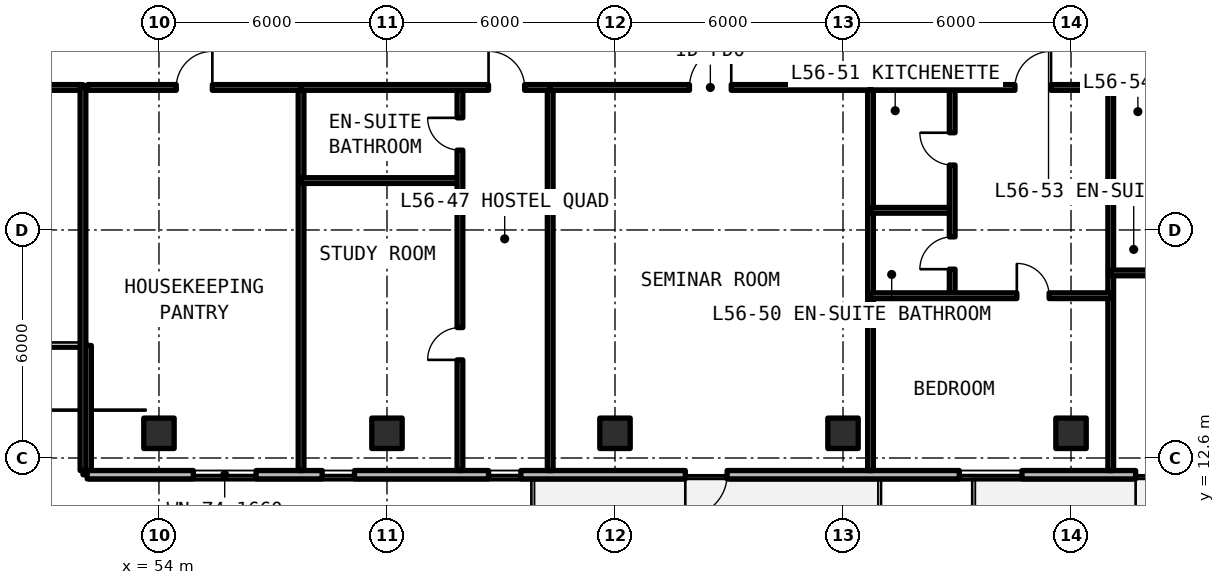
"""IFC4 building model, lengths in metres.
Left out: names, types, materials, properties, quantities, classifications, styles, units other than length and angle.
Written with IfcOpenShell. Run it as: python <this file> out.ifc"""

import sys

from ifc_helpers import new_model, si_unit, direction, frame, frame_2d, origin, origin_2d, place, context, subcontext, project, spatial, rectangle, extrude, element, fill, save


model = new_model("IFC4")
c1 = context("Model", 3, precision=1e-05, world=origin(), true_north=direction((0.0, 1.0)))
c2 = subcontext(c1, "Body", "Model", "MODEL_VIEW")
j1 = project(units=[si_unit("LENGTHUNIT", "METRE"), si_unit("PLANEANGLEUNIT", "RADIAN")], contexts=[c1])
p1 = place(None, origin())
s1 = spatial("IfcSite", under=j1, at=p1, CompositionType="ELEMENT")
p2 = place(p1, origin())
s2 = spatial("IfcBuilding", under=s1, at=p2, CompositionType="ELEMENT")
p3 = place(p2, frame((0.0, 0.0, 201.63)))
s3 = spatial("IfcBuildingStorey", under=s2, at=p3, CompositionType="ELEMENT", Elevation=201.63)
for number, where, z_axis, x_axis in (
    (1, (54.0, 13.25, 0.0), (0.0, 0.0, 1.0), (1.0, 0.0, 0.0)),
    (2, (60.0, 13.25, 0.0), (0.0, 0.0, 1.0), (1.0, 0.0, 0.0)),
    (3, (66.0, 13.25, 0.0), (0.0, 0.0, 1.0), (1.0, 0.0, 0.0)),
    (4, (72.0, 13.25, 0.0), (0.0, 0.0, 1.0), (1.0, 0.0, 0.0)),
    (5, (78.0, 13.25, 0.0), (0.0, 0.0, 1.0), (1.0, 0.0, 0.0)),
):
    element("IfcColumn", number, at=place(p3, frame(where, z_axis=z_axis, x_axis=x_axis)), inside=s3, PredefinedType="COLUMN", context=c2, shape_type="SweptSolid", body=[
        extrude(rectangle(XDim=0.8, YDim=0.8, at=origin_2d()), origin(), (0.0, 0.0, 1.0), 3.3),
    ])
p4 = place(p3, frame((52.11, 15.56, 0.0), z_axis=(0.0, 0.0, 1.0), x_axis=(0.0, -1.0, 0.0)))
e6 = element("IfcWall", 6, at=p4, inside=s3, PredefinedType="SOLIDWALL", context=c2, shape_type="SweptSolid", body=[
    extrude(rectangle(XDim=3.4, YDim=0.22, at=frame_2d((1.7, 0.0))), origin(), (0.0, 0.0, 1.0), 3.08),
])
p5 = place(p3, frame((52.11, 12.16, 0.0), z_axis=(0.0, 0.0, 1.0), x_axis=(1.0, 0.0, 0.0)))
e7 = element("IfcWall", 7, at=p5, inside=s3, PredefinedType="SOLIDWALL", context=c2, shape_type="SweptSolid", body=[
    extrude(rectangle(XDim=43.244, YDim=0.22, at=frame_2d((21.622, 0.0))), origin(), (0.0, 0.0, 1.0), 3.08),
])
p6 = place(p5, frame((15.74, 0.0, 0.0)))
e8 = element("IfcOpeningElement", 8, at=p6, cuts=e7, PredefinedType="OPENING", context=c2, shape_type="SweptSolid", body=[
    extrude(rectangle(XDim=1.1, YDim=2.15, at=frame_2d((0.55, 1.075))), frame((0.0, 0.12, 0.0), z_axis=(0.0, -1.0, 0.0), x_axis=(1.0, 0.0, 0.0)), (0.0, 0.0, 1.0), 0.24),
])
p7 = place(p5, frame((27.59, 0.0, 0.0)))
e9 = element("IfcOpeningElement", 9, at=p7, cuts=e7, PredefinedType="OPENING", context=c2, shape_type="SweptSolid", body=[
    extrude(rectangle(XDim=1.1, YDim=2.15, at=frame_2d((0.55, 1.075))), frame((0.0, 0.12, 0.0), z_axis=(0.0, -1.0, 0.0), x_axis=(1.0, 0.0, 0.0)), (0.0, 0.0, 1.0), 0.24),
])
p8 = place(p5, frame((2.795, 0.0, 0.78)))
e10 = element("IfcOpeningElement", 10, at=p8, cuts=e7, PredefinedType="OPENING", context=c2, shape_type="SweptSolid", body=[
    extrude(rectangle(XDim=1.65, YDim=1.66, at=frame_2d((0.825, 0.83))), frame((0.0, 0.12, 0.0), z_axis=(0.0, -1.0, 0.0), x_axis=(1.0, 0.0, 0.0)), (0.0, 0.0, 1.0), 0.24),
])
p9 = place(p5, frame((6.185, 0.0, 0.78)))
e11 = element("IfcOpeningElement", 11, at=p9, cuts=e7, PredefinedType="OPENING", context=c2, shape_type="SweptSolid", body=[
    extrude(rectangle(XDim=0.85, YDim=1.65, at=frame_2d((0.425, 0.825))), frame((0.0, 0.12, 0.0), z_axis=(0.0, -1.0, 0.0), x_axis=(1.0, 0.0, 0.0)), (0.0, 0.0, 1.0), 0.24),
])
p10 = place(p5, frame((10.562, 0.0, 0.78)))
e12 = element("IfcOpeningElement", 12, at=p10, cuts=e7, PredefinedType="OPENING", context=c2, shape_type="SweptSolid", body=[
    extrude(rectangle(XDim=0.85, YDim=1.65, at=frame_2d((0.425, 0.825))), frame((0.0, 0.12, 0.0), z_axis=(0.0, -1.0, 0.0), x_axis=(1.0, 0.0, 0.0)), (0.0, 0.0, 1.0), 0.24),
])
p11 = place(p5, frame((22.949, 0.0, 0.78)))
e13 = element("IfcOpeningElement", 13, at=p11, cuts=e7, PredefinedType="OPENING", context=c2, shape_type="SweptSolid", body=[
    extrude(rectangle(XDim=1.65, YDim=1.66, at=frame_2d((0.825, 0.83))), frame((0.0, 0.12, 0.0), z_axis=(0.0, -1.0, 0.0), x_axis=(1.0, 0.0, 0.0)), (0.0, 0.0, 1.0), 0.24),
])
p12 = place(p5, frame((33.573, 0.0, 0.78)))
e14 = element("IfcOpeningElement", 14, at=p12, cuts=e7, PredefinedType="OPENING", context=c2, shape_type="SweptSolid", body=[
    extrude(rectangle(XDim=1.65, YDim=1.66, at=frame_2d((0.825, 0.83))), frame((0.0, 0.12, 0.0), z_axis=(0.0, -1.0, 0.0), x_axis=(1.0, 0.0, 0.0)), (0.0, 0.0, 1.0), 0.24),
])
p13 = place(p5, frame((38.514, 0.0, 0.78)))
e15 = element("IfcOpeningElement", 15, at=p13, cuts=e7, PredefinedType="OPENING", context=c2, shape_type="SweptSolid", body=[
    extrude(rectangle(XDim=0.85, YDim=1.65, at=frame_2d((0.425, 0.825))), frame((0.0, 0.12, 0.0), z_axis=(0.0, -1.0, 0.0), x_axis=(1.0, 0.0, 0.0)), (0.0, 0.0, 1.0), 0.24),
])
p14 = place(p5, frame((40.615, 0.0, 0.78)))
e16 = element("IfcOpeningElement", 16, at=p14, cuts=e7, PredefinedType="OPENING", context=c2, shape_type="SweptSolid", body=[
    extrude(rectangle(XDim=1.65, YDim=1.66, at=frame_2d((0.825, 0.83))), frame((0.0, 0.12, 0.0), z_axis=(0.0, -1.0, 0.0), x_axis=(1.0, 0.0, 0.0)), (0.0, 0.0, 1.0), 0.24),
])
p15 = place(p3, frame((43.6, 22.35, 0.0), z_axis=(0.0, 0.0, 1.0), x_axis=(1.0, 0.0, 0.0)))
e17 = element("IfcWall", 17, at=p15, inside=s3, PredefinedType="SOLIDWALL", context=c2, shape_type="SweptSolid", body=[
    extrude(rectangle(XDim=8.4, YDim=0.15, at=frame_2d((4.2, 0.0))), origin(), (0.0, 0.0, 1.0), 2.35),
])
p16 = place(p15, frame((3.65, 0.0, 0.0)))
e18 = element("IfcOpeningElement", 18, at=p16, cuts=e17, PredefinedType="OPENING", context=c2, shape_type="SweptSolid", body=[
    extrude(rectangle(XDim=1.1, YDim=2.15, at=frame_2d((0.55, 1.075))), frame((0.0, 0.085, 0.0), z_axis=(0.0, -1.0, 0.0), x_axis=(1.0, 0.0, 0.0)), (0.0, 0.0, 1.0), 0.17),
])
for number, where, z_axis, x_axis in (
    (19, (52.0, 12.27, 0.0), (0.0, 0.0, 1.0), (0.0, 1.0, 0.0)),
    (20, (57.739, 12.27, 0.0), (0.0, 0.0, 1.0), (0.0, 1.0, 0.0)),
):
    element("IfcWall", number, at=place(p3, frame(where, z_axis=z_axis, x_axis=x_axis)), inside=s3, PredefinedType="SOLIDWALL", context=c2, shape_type="SweptSolid", body=[
        extrude(rectangle(XDim=10.08, YDim=0.15, at=frame_2d((5.04, 0.0))), origin(), (0.0, 0.0, 1.0), 2.35),
    ])
p17 = place(p3, frame((52.12, 22.35, 0.0), z_axis=(0.0, 0.0, 1.0), x_axis=(1.0, 0.0, 0.0)))
e21 = element("IfcWall", 21, at=p17, inside=s3, PredefinedType="SOLIDWALL", context=c2, shape_type="SweptSolid", body=[
    extrude(rectangle(XDim=5.619, YDim=0.15, at=frame_2d((2.81, 0.0))), origin(), (0.0, 0.0, 1.0), 2.35),
])
p18 = place(p17, frame((2.335, 0.0, 0.0)))
e22 = element("IfcOpeningElement", 22, at=p18, cuts=e21, PredefinedType="OPENING", context=c2, shape_type="SweptSolid", body=[
    extrude(rectangle(XDim=0.95, YDim=2.15, at=frame_2d((0.475, 1.075))), frame((0.0, 0.085, 0.0), z_axis=(0.0, -1.0, 0.0), x_axis=(1.0, 0.0, 0.0)), (0.0, 0.0, 1.0), 0.17),
])
p19 = place(p3, frame((64.295, 12.27, 0.0), z_axis=(0.0, 0.0, 1.0), x_axis=(0.0, 1.0, 0.0)))
e23 = element("IfcWall", 23, at=p19, inside=s3, PredefinedType="SOLIDWALL", context=c2, shape_type="SweptSolid", body=[
    extrude(rectangle(XDim=10.08, YDim=0.15, at=frame_2d((5.04, 0.0))), origin(), (0.0, 0.0, 1.0), 2.35),
])
p20 = place(p3, frame((57.739, 19.9, 0.0), z_axis=(0.0, 0.0, 1.0), x_axis=(1.0, 0.0, 0.0)))
e24 = element("IfcWall", 24, at=p20, inside=s3, PredefinedType="PARTITIONING", context=c2, shape_type="SweptSolid", body=[
    extrude(rectangle(XDim=4.181, YDim=0.15, at=frame_2d((2.09, 0.0))), origin(), (0.0, 0.0, 1.0), 2.35),
])
p21 = place(p3, frame((61.92, 12.27, 0.0), z_axis=(0.0, 0.0, 1.0), x_axis=(0.0, 1.0, 0.0)))
e25 = element("IfcWall", 25, at=p21, inside=s3, PredefinedType="PARTITIONING", context=c2, shape_type="SweptSolid", body=[
    extrude(rectangle(XDim=10.08, YDim=0.15, at=frame_2d((5.04, 0.0))), origin(), (0.0, 0.0, 1.0), 2.35),
])
p22 = place(p21, frame((2.912, 0.0, 0.0)))
e26 = element("IfcOpeningElement", 26, at=p22, cuts=e25, PredefinedType="OPENING", context=c2, shape_type="SweptSolid", body=[
    extrude(rectangle(XDim=0.85, YDim=2.1, at=frame_2d((0.425, 1.05))), frame((0.0, 0.085, 0.0), z_axis=(0.0, -1.0, 0.0), x_axis=(1.0, 0.0, 0.0)), (0.0, 0.0, 1.0), 0.17),
])
p23 = place(p21, frame((8.43, 0.0, 0.0)))
e27 = element("IfcOpeningElement", 27, at=p23, cuts=e25, PredefinedType="OPENING", context=c2, shape_type="SweptSolid", body=[
    extrude(rectangle(XDim=0.85, YDim=2.1, at=frame_2d((0.425, 1.05))), frame((0.0, 0.085, 0.0), z_axis=(0.0, -1.0, 0.0), x_axis=(1.0, 0.0, 0.0)), (0.0, 0.0, 1.0), 0.17),
])
p24 = place(p3, frame((57.739, 22.35, 0.0), z_axis=(0.0, 0.0, 1.0), x_axis=(1.0, 0.0, 0.0)))
e28 = element("IfcWall", 28, at=p24, inside=s3, PredefinedType="SOLIDWALL", context=c2, shape_type="SweptSolid", body=[
    extrude(rectangle(XDim=6.556, YDim=0.15, at=frame_2d((3.278, 0.0))), origin(), (0.0, 0.0, 1.0), 2.35),
])
p25 = place(p24, frame((4.933, 0.0, 0.0)))
e29 = element("IfcOpeningElement", 29, at=p25, cuts=e28, PredefinedType="OPENING", context=c2, shape_type="SweptSolid", body=[
    extrude(rectangle(XDim=0.95, YDim=2.15, at=frame_2d((0.475, 1.075))), frame((0.0, 0.085, 0.0), z_axis=(0.0, -1.0, 0.0), x_axis=(1.0, 0.0, 0.0)), (0.0, 0.0, 1.0), 0.17),
])
p26 = place(p3, frame((72.723, 12.27, 0.0), z_axis=(0.0, 0.0, 1.0), x_axis=(0.0, 1.0, 0.0)))
e30 = element("IfcWall", 30, at=p26, inside=s3, PredefinedType="SOLIDWALL", context=c2, shape_type="SweptSolid", body=[
    extrude(rectangle(XDim=10.08, YDim=0.15, at=frame_2d((5.04, 0.0))), origin(), (0.0, 0.0, 1.0), 2.35),
])
p27 = place(p3, frame((64.295, 22.35, 0.0), z_axis=(0.0, 0.0, 1.0), x_axis=(1.0, 0.0, 0.0)))
e31 = element("IfcWall", 31, at=p27, inside=s3, PredefinedType="SOLIDWALL", context=c2, shape_type="SweptSolid", body=[
    extrude(rectangle(XDim=8.428, YDim=0.15, at=frame_2d((4.214, 0.0))), origin(), (0.0, 0.0, 1.0), 2.35),
])
p28 = place(p27, frame((3.664, 0.0, 0.0)))
e32 = element("IfcOpeningElement", 32, at=p28, cuts=e31, PredefinedType="OPENING", context=c2, shape_type="SweptSolid", body=[
    extrude(rectangle(XDim=1.1, YDim=2.15, at=frame_2d((0.55, 1.075))), frame((0.0, 0.085, 0.0), z_axis=(0.0, -1.0, 0.0), x_axis=(1.0, 0.0, 0.0)), (0.0, 0.0, 1.0), 0.17),
])
p29 = place(p3, frame((79.045, 12.27, 0.0), z_axis=(0.0, 0.0, 1.0), x_axis=(0.0, 1.0, 0.0)))
e33 = element("IfcWall", 33, at=p29, inside=s3, PredefinedType="SOLIDWALL", context=c2, shape_type="SweptSolid", body=[
    extrude(rectangle(XDim=10.08, YDim=0.15, at=frame_2d((5.04, 0.0))), origin(), (0.0, 0.0, 1.0), 2.35),
])
p30 = place(p3, frame((72.723, 19.117, 0.0), z_axis=(0.0, 0.0, 1.0), x_axis=(1.0, 0.0, 0.0)))
e34 = element("IfcWall", 34, at=p30, inside=s3, PredefinedType="PARTITIONING", context=c2, shape_type="SweptSolid", body=[
    extrude(rectangle(XDim=2.149, YDim=0.15, at=frame_2d((1.075, 0.0))), origin(), (0.0, 0.0, 1.0), 2.35),
])
p31 = place(p3, frame((74.873, 16.87, 0.0), z_axis=(0.0, 0.0, 1.0), x_axis=(0.0, 1.0, 0.0)))
e35 = element("IfcWall", 35, at=p31, inside=s3, PredefinedType="PARTITIONING", context=c2, shape_type="SweptSolid", body=[
    extrude(rectangle(XDim=5.48, YDim=0.15, at=frame_2d((2.74, 0.0))), origin(), (0.0, 0.0, 1.0), 2.35),
])
p32 = place(p31, frame((0.698, 0.0, 0.0)))
e36 = element("IfcOpeningElement", 36, at=p32, cuts=e35, PredefinedType="OPENING", context=c2, shape_type="SweptSolid", body=[
    extrude(rectangle(XDim=0.85, YDim=2.1, at=frame_2d((0.425, 1.05))), frame((0.0, 0.085, 0.0), z_axis=(0.0, -1.0, 0.0), x_axis=(1.0, 0.0, 0.0)), (0.0, 0.0, 1.0), 0.17),
])
p33 = place(p31, frame((3.438, 0.0, 0.0)))
e37 = element("IfcOpeningElement", 37, at=p33, cuts=e35, PredefinedType="OPENING", context=c2, shape_type="SweptSolid", body=[
    extrude(rectangle(XDim=0.85, YDim=2.1, at=frame_2d((0.425, 1.05))), frame((0.0, 0.085, 0.0), z_axis=(0.0, -1.0, 0.0), x_axis=(1.0, 0.0, 0.0)), (0.0, 0.0, 1.0), 0.17),
])
p34 = place(p3, frame((72.723, 16.87, 0.0), z_axis=(0.0, 0.0, 1.0), x_axis=(1.0, 0.0, 0.0)))
e38 = element("IfcWall", 38, at=p34, inside=s3, PredefinedType="PARTITIONING", context=c2, shape_type="SweptSolid", body=[
    extrude(rectangle(XDim=6.322, YDim=0.15, at=frame_2d((3.161, 0.0))), origin(), (0.0, 0.0, 1.0), 2.35),
])
p35 = place(p34, frame((3.85, 0.0, 0.0)))
e39 = element("IfcOpeningElement", 39, at=p35, cuts=e38, PredefinedType="OPENING", context=c2, shape_type="SweptSolid", body=[
    extrude(rectangle(XDim=0.85, YDim=2.1, at=frame_2d((0.425, 1.05))), frame((0.0, 0.085, 0.0), z_axis=(0.0, -1.0, 0.0), x_axis=(1.0, 0.0, 0.0)), (0.0, 0.0, 1.0), 0.17),
])
p36 = place(p3, frame((72.723, 22.35, 0.0), z_axis=(0.0, 0.0, 1.0), x_axis=(1.0, 0.0, 0.0)))
e40 = element("IfcWall", 40, at=p36, inside=s3, PredefinedType="SOLIDWALL", context=c2, shape_type="SweptSolid", body=[
    extrude(rectangle(XDim=6.322, YDim=0.15, at=frame_2d((3.161, 0.0))), origin(), (0.0, 0.0, 1.0), 2.35),
])
p37 = place(p36, frame((3.8, 0.0, 0.0)))
e41 = element("IfcOpeningElement", 41, at=p37, cuts=e40, PredefinedType="OPENING", context=c2, shape_type="SweptSolid", body=[
    extrude(rectangle(XDim=0.95, YDim=2.15, at=frame_2d((0.475, 1.075))), frame((0.0, 0.085, 0.0), z_axis=(0.0, -1.0, 0.0), x_axis=(1.0, 0.0, 0.0)), (0.0, 0.0, 1.0), 0.17),
])
p38 = place(p3, frame((79.045, 19.471, 0.0), z_axis=(0.0, 0.0, 1.0), x_axis=(1.0, 0.0, 0.0)))
e42 = element("IfcWall", 42, at=p38, inside=s3, PredefinedType="PARTITIONING", context=c2, shape_type="SweptSolid", body=[
    extrude(rectangle(XDim=2.35, YDim=0.15, at=frame_2d((1.175, 0.0))), origin(), (0.0, 0.0, 1.0), 2.35),
])
p39 = place(p3, frame((79.045, 17.47, 0.0), z_axis=(0.0, 0.0, 1.0), x_axis=(1.0, 0.0, 0.0)))
e43 = element("IfcWall", 43, at=p39, inside=s3, PredefinedType="PARTITIONING", context=c2, shape_type="SweptSolid", body=[
    extrude(rectangle(XDim=9.833, YDim=0.15, at=frame_2d((4.917, 0.0))), origin(), (0.0, 0.0, 1.0), 2.35),
])
p40 = place(p39, frame((3.307, 0.0, 0.0)))
e44 = element("IfcOpeningElement", 44, at=p40, cuts=e43, PredefinedType="OPENING", context=c2, shape_type="SweptSolid", body=[
    extrude(rectangle(XDim=0.85, YDim=2.1, at=frame_2d((0.425, 1.05))), frame((0.0, 0.085, 0.0), z_axis=(0.0, -1.0, 0.0), x_axis=(1.0, 0.0, 0.0)), (0.0, 0.0, 1.0), 0.17),
])
p41 = place(p39, frame((7.048, 0.0, 0.0)))
e45 = element("IfcOpeningElement", 45, at=p41, cuts=e43, PredefinedType="OPENING", context=c2, shape_type="SweptSolid", body=[
    extrude(rectangle(XDim=0.85, YDim=2.1, at=frame_2d((0.425, 1.05))), frame((0.0, 0.085, 0.0), z_axis=(0.0, -1.0, 0.0), x_axis=(1.0, 0.0, 0.0)), (0.0, 0.0, 1.0), 0.17),
])
p42 = place(p3, frame((79.045, 22.35, 0.0), z_axis=(0.0, 0.0, 1.0), x_axis=(1.0, 0.0, 0.0)))
e46 = element("IfcWall", 46, at=p42, inside=s3, PredefinedType="SOLIDWALL", context=c2, shape_type="SweptSolid", body=[
    extrude(rectangle(XDim=9.833, YDim=0.15, at=frame_2d((4.917, 0.0))), origin(), (0.0, 0.0, 1.0), 2.35),
])
p43 = place(p42, frame((5.657, 0.0, 0.0)))
e47 = element("IfcOpeningElement", 47, at=p43, cuts=e46, PredefinedType="OPENING", context=c2, shape_type="SweptSolid", body=[
    extrude(rectangle(XDim=0.95, YDim=2.15, at=frame_2d((0.475, 1.075))), frame((0.0, 0.085, 0.0), z_axis=(0.0, -1.0, 0.0), x_axis=(1.0, 0.0, 0.0)), (0.0, 0.0, 1.0), 0.17),
])
p44 = place(p6, frame((1.1, 0.0, 0.0), z_axis=(0.0, 0.0, 1.0), x_axis=(-1.0, 0.0, 0.0)))
e48 = element("IfcDoor", 48, at=p44, inside=s3, OperationType="SINGLE_SWING_RIGHT", PredefinedType="DOOR", context=c2, shape_type="SweptSolid", body=[
    extrude(rectangle(XDim=1.1, YDim=2.15, at=frame_2d((0.55, 1.075))), frame((0.0, 0.025, 0.0), z_axis=(0.0, -1.0, 0.0), x_axis=(1.0, 0.0, 0.0)), (0.0, 0.0, 1.0), 0.05),
])
fill(e8, e48)
p45 = place(p7, frame((1.1, 0.0, 0.0), z_axis=(0.0, 0.0, 1.0), x_axis=(-1.0, 0.0, 0.0)))
e49 = element("IfcDoor", 49, at=p45, inside=s3, OperationType="SINGLE_SWING_LEFT", PredefinedType="DOOR", context=c2, shape_type="SweptSolid", body=[
    extrude(rectangle(XDim=1.1, YDim=2.15, at=frame_2d((0.55, 1.075))), frame((0.0, 0.025, 0.0), z_axis=(0.0, -1.0, 0.0), x_axis=(1.0, 0.0, 0.0)), (0.0, 0.0, 1.0), 0.05),
])
fill(e9, e49)
p46 = place(p8, origin())
e50 = element("IfcWindow", 50, at=p46, inside=s3, PartitioningType="SINGLE_PANEL", PredefinedType="WINDOW", context=c2, shape_type="SweptSolid", body=[
    extrude(rectangle(XDim=1.65, YDim=1.66, at=frame_2d((0.825, 0.83))), frame((0.0, 0.03, 0.0), z_axis=(0.0, -1.0, 0.0), x_axis=(1.0, 0.0, 0.0)), (0.0, 0.0, 1.0), 0.06),
])
fill(e10, e50)
p47 = place(p9, origin())
e51 = element("IfcWindow", 51, at=p47, inside=s3, PartitioningType="SINGLE_PANEL", PredefinedType="WINDOW", context=c2, shape_type="SweptSolid", body=[
    extrude(rectangle(XDim=0.85, YDim=1.65, at=frame_2d((0.425, 0.825))), frame((0.0, 0.03, 0.0), z_axis=(0.0, -1.0, 0.0), x_axis=(1.0, 0.0, 0.0)), (0.0, 0.0, 1.0), 0.06),
])
fill(e11, e51)
p48 = place(p10, origin())
e52 = element("IfcWindow", 52, at=p48, inside=s3, PartitioningType="SINGLE_PANEL", PredefinedType="WINDOW", context=c2, shape_type="SweptSolid", body=[
    extrude(rectangle(XDim=0.85, YDim=1.65, at=frame_2d((0.425, 0.825))), frame((0.0, 0.03, 0.0), z_axis=(0.0, -1.0, 0.0), x_axis=(1.0, 0.0, 0.0)), (0.0, 0.0, 1.0), 0.06),
])
fill(e12, e52)
p49 = place(p11, origin())
e53 = element("IfcWindow", 53, at=p49, inside=s3, PartitioningType="SINGLE_PANEL", PredefinedType="WINDOW", context=c2, shape_type="SweptSolid", body=[
    extrude(rectangle(XDim=1.65, YDim=1.66, at=frame_2d((0.825, 0.83))), frame((0.0, 0.03, 0.0), z_axis=(0.0, -1.0, 0.0), x_axis=(1.0, 0.0, 0.0)), (0.0, 0.0, 1.0), 0.06),
])
fill(e13, e53)
p50 = place(p18, origin())
e54 = element("IfcDoor", 54, at=p50, inside=s3, OperationType="SINGLE_SWING_RIGHT", PredefinedType="DOOR", context=c2, shape_type="SweptSolid", body=[
    extrude(rectangle(XDim=0.95, YDim=2.15, at=frame_2d((0.475, 1.075))), frame((0.0, 0.025, 0.0), z_axis=(0.0, -1.0, 0.0), x_axis=(1.0, 0.0, 0.0)), (0.0, 0.0, 1.0), 0.05),
])
fill(e22, e54)
p51 = place(p22, origin())
e55 = element("IfcDoor", 55, at=p51, inside=s3, OperationType="SINGLE_SWING_LEFT", PredefinedType="DOOR", context=c2, shape_type="SweptSolid", body=[
    extrude(rectangle(XDim=0.85, YDim=2.1, at=frame_2d((0.425, 1.05))), frame((0.0, 0.025, 0.0), z_axis=(0.0, -1.0, 0.0), x_axis=(1.0, 0.0, 0.0)), (0.0, 0.0, 1.0), 0.05),
])
fill(e26, e55)
p52 = place(p23, origin())
e56 = element("IfcDoor", 56, at=p52, inside=s3, OperationType="SINGLE_SWING_RIGHT", PredefinedType="DOOR", context=c2, shape_type="SweptSolid", body=[
    extrude(rectangle(XDim=0.85, YDim=2.1, at=frame_2d((0.425, 1.05))), frame((0.0, 0.025, 0.0), z_axis=(0.0, -1.0, 0.0), x_axis=(1.0, 0.0, 0.0)), (0.0, 0.0, 1.0), 0.05),
])
fill(e27, e56)
p53 = place(p25, origin())
e57 = element("IfcDoor", 57, at=p53, inside=s3, OperationType="SINGLE_SWING_LEFT", PredefinedType="DOOR", context=c2, shape_type="SweptSolid", body=[
    extrude(rectangle(XDim=0.95, YDim=2.15, at=frame_2d((0.475, 1.075))), frame((0.0, 0.025, 0.0), z_axis=(0.0, -1.0, 0.0), x_axis=(1.0, 0.0, 0.0)), (0.0, 0.0, 1.0), 0.05),
])
fill(e29, e57)
p54 = place(p28, origin())
e58 = element("IfcDoor", 58, at=p54, inside=s3, OperationType="SINGLE_SWING_RIGHT", PredefinedType="DOOR", context=c2, shape_type="SweptSolid", body=[
    extrude(rectangle(XDim=1.1, YDim=2.15, at=frame_2d((0.55, 1.075))), frame((0.0, 0.025, 0.0), z_axis=(0.0, -1.0, 0.0), x_axis=(1.0, 0.0, 0.0)), (0.0, 0.0, 1.0), 0.05),
])
fill(e32, e58)
p55 = place(p32, origin())
e59 = element("IfcDoor", 59, at=p55, inside=s3, OperationType="SINGLE_SWING_LEFT", PredefinedType="DOOR", context=c2, shape_type="SweptSolid", body=[
    extrude(rectangle(XDim=0.85, YDim=2.1, at=frame_2d((0.425, 1.05))), frame((0.0, 0.025, 0.0), z_axis=(0.0, -1.0, 0.0), x_axis=(1.0, 0.0, 0.0)), (0.0, 0.0, 1.0), 0.05),
])
fill(e36, e59)
p56 = place(p33, origin())
e60 = element("IfcDoor", 60, at=p56, inside=s3, OperationType="SINGLE_SWING_RIGHT", PredefinedType="DOOR", context=c2, shape_type="SweptSolid", body=[
    extrude(rectangle(XDim=0.85, YDim=2.1, at=frame_2d((0.425, 1.05))), frame((0.0, 0.025, 0.0), z_axis=(0.0, -1.0, 0.0), x_axis=(1.0, 0.0, 0.0)), (0.0, 0.0, 1.0), 0.05),
])
fill(e37, e60)
p57 = place(p35, origin())
e61 = element("IfcDoor", 61, at=p57, inside=s3, OperationType="SINGLE_SWING_LEFT", PredefinedType="DOOR", context=c2, shape_type="SweptSolid", body=[
    extrude(rectangle(XDim=0.85, YDim=2.1, at=frame_2d((0.425, 1.05))), frame((0.0, 0.025, 0.0), z_axis=(0.0, -1.0, 0.0), x_axis=(1.0, 0.0, 0.0)), (0.0, 0.0, 1.0), 0.05),
])
fill(e39, e61)
p58 = place(p37, origin())
e62 = element("IfcDoor", 62, at=p58, inside=s3, OperationType="SINGLE_SWING_RIGHT", PredefinedType="DOOR", context=c2, shape_type="SweptSolid", body=[
    extrude(rectangle(XDim=0.95, YDim=2.15, at=frame_2d((0.475, 1.075))), frame((0.0, 0.025, 0.0), z_axis=(0.0, -1.0, 0.0), x_axis=(1.0, 0.0, 0.0)), (0.0, 0.0, 1.0), 0.05),
])
fill(e41, e62)
save(model, sys.argv[1])
